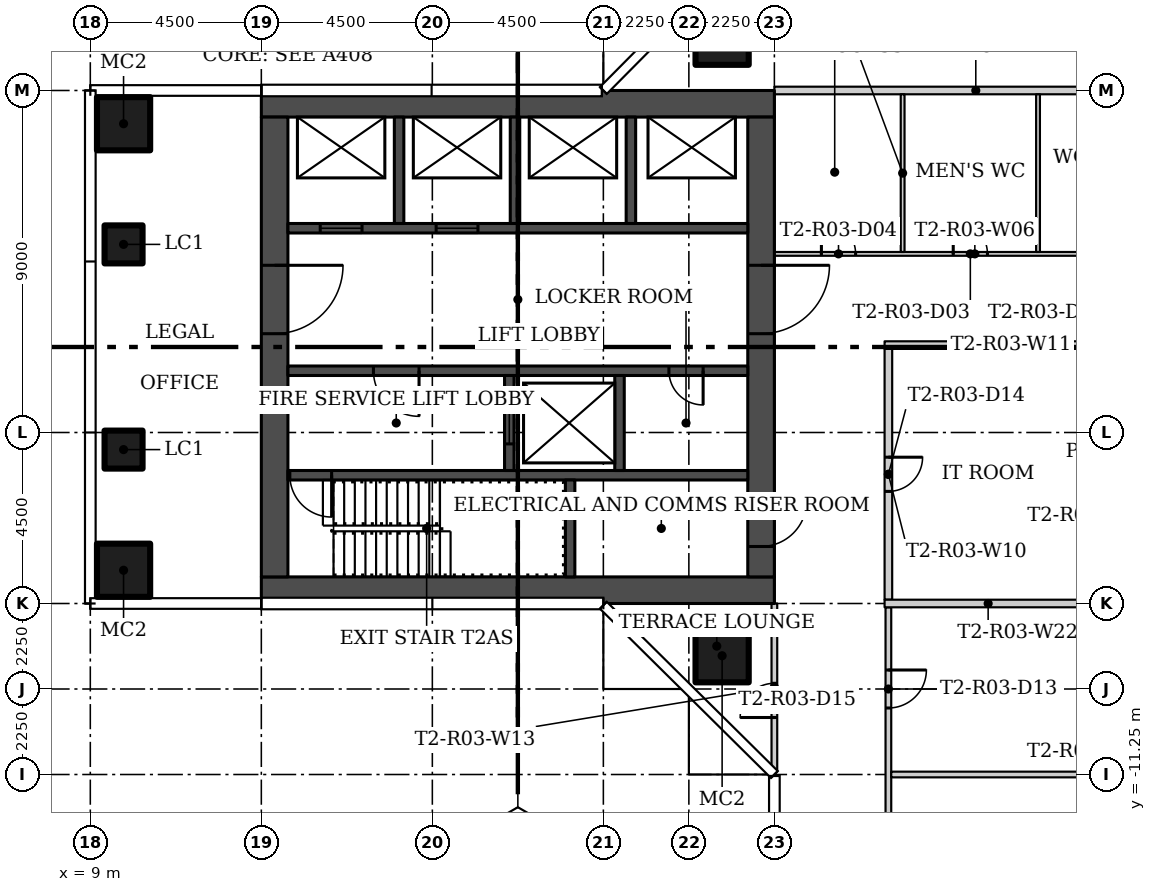
"""IFC4 building model, lengths in metres.
Left out: names, types, materials, properties, quantities, classifications, styles, units other than length and angle.
Written with IfcOpenShell. Run it as: python <this file> out.ifc"""

import sys

from ifc_helpers import new_model, si_unit, direction, frame, frame_2d, origin, origin_2d, place, context, subcontext, project, spatial, rectangle, hollow_rectangle, extrude, element, fill, save


model = new_model("IFC4")
c1 = context("Model", 3, precision=1e-05, world=origin(), true_north=direction((0.0, 1.0)))
c2 = subcontext(c1, "Body", "Model", "MODEL_VIEW")
j1 = project(units=[si_unit("LENGTHUNIT", "METRE"), si_unit("PLANEANGLEUNIT", "RADIAN")], contexts=[c1])
p1 = place(None, origin())
s1 = spatial("IfcSite", under=j1, at=p1, CompositionType="ELEMENT")
p2 = place(p1, origin())
s2 = spatial("IfcBuilding", under=s1, at=p2, CompositionType="ELEMENT")
p3 = place(p2, frame((0.0, 0.0, 42.0)))
s3 = spatial("IfcBuildingStorey", under=s2, at=p3, CompositionType="ELEMENT", Elevation=42.0)
for number, where in (
    (1, (25.625, 8.125, 0.0)),
    (2, (25.625, -8.125, 0.0)),
    (3, (9.875, -5.875, 0.0)),
    (4, (9.875, 5.875, 0.0)),
):
    element("IfcColumn", number, at=place(p3, frame(where)), inside=s3, PredefinedType="COLUMN", context=c2, shape_type="SweptSolid", body=[
        extrude(hollow_rectangle(XDim=1.4, YDim=1.4, WallThickness=0.05, at=origin_2d()), origin(), (0.0, 0.0, 1.0), 3.55),
    ])
for number, where in (
    (5, (9.875, -2.7, 0.0)),
    (6, (9.875, 2.7, 0.0)),
):
    element("IfcColumn", number, at=place(p3, frame(where)), inside=s3, PredefinedType="COLUMN", context=c2, shape_type="SweptSolid", body=[
        extrude(hollow_rectangle(XDim=1.0, YDim=1.0, WallThickness=0.04, at=origin_2d()), origin(), (0.0, 0.0, 1.0), 3.55),
    ])
p4 = place(p3, frame((27.0, 2.45, 0.0)))
e7 = element("IfcWall", 7, at=p4, inside=s3, PredefinedType="PARTITIONING", context=c2, shape_type="SweptSolid", body=[
    extrude(rectangle(XDim=10.55, YDim=0.1, at=frame_2d((5.275, 0.0))), origin(), (0.0, 0.0, 1.0), 3.55),
])
p5 = place(p4, frame((8.269, 0.0, 0.0)))
e8 = element("IfcOpeningElement", 8, at=p5, cuts=e7, PredefinedType="OPENING", context=c2, shape_type="SweptSolid", body=[
    extrude(rectangle(XDim=0.9, YDim=2.1, at=frame_2d((0.45, 1.05))), frame((0.0, 0.06, 0.0), z_axis=(0.0, -1.0, 0.0), x_axis=(1.0, 0.0, 0.0)), (0.0, 0.0, 1.0), 0.12),
])
p6 = place(p4, frame((4.706, 0.0, 0.0)))
e9 = element("IfcOpeningElement", 9, at=p6, cuts=e7, PredefinedType="OPENING", context=c2, shape_type="SweptSolid", body=[
    extrude(rectangle(XDim=0.9, YDim=2.1, at=frame_2d((0.45, 1.05))), frame((0.0, 0.06, 0.0), z_axis=(0.0, -1.0, 0.0), x_axis=(1.0, 0.0, 0.0)), (0.0, 0.0, 1.0), 0.12),
])
p7 = place(p4, frame((1.238, 0.0, 0.0)))
e10 = element("IfcOpeningElement", 10, at=p7, cuts=e7, PredefinedType="OPENING", context=c2, shape_type="SweptSolid", body=[
    extrude(rectangle(XDim=0.9, YDim=2.1, at=frame_2d((0.45, 1.05))), frame((0.0, 0.06, 0.0), z_axis=(0.0, -1.0, 0.0), x_axis=(1.0, 0.0, 0.0)), (0.0, 0.0, 1.0), 0.12),
])
p8 = place(p3, frame((30.0, -6.85, 0.0), z_axis=(0.0, 0.0, 1.0), x_axis=(0.0, -1.0, 0.0)))
e11 = element("IfcWall", 11, at=p8, inside=s3, PredefinedType="PARTITIONING", context=c2, shape_type="SweptSolid", body=[
    extrude(rectangle(XDim=13.325, YDim=0.15, at=frame_2d((6.663, 0.0))), origin(), (0.0, 0.0, 1.0), 3.55),
])
p9 = place(p8, frame((10.4, 0.0, 0.0)))
e12 = element("IfcOpeningElement", 12, at=p9, cuts=e11, PredefinedType="OPENING", context=c2, shape_type="SweptSolid", body=[
    extrude(rectangle(XDim=1.5, YDim=2.1, at=frame_2d((0.75, 1.05))), frame((0.0, 0.085, 0.0), z_axis=(0.0, -1.0, 0.0), x_axis=(1.0, 0.0, 0.0)), (0.0, 0.0, 1.0), 0.17),
])
p10 = place(p8, frame((5.9, 0.0, 0.0)))
e13 = element("IfcOpeningElement", 13, at=p10, cuts=e11, PredefinedType="OPENING", context=c2, shape_type="SweptSolid", body=[
    extrude(rectangle(XDim=1.5, YDim=2.1, at=frame_2d((0.75, 1.05))), frame((0.0, 0.085, 0.0), z_axis=(0.0, -1.0, 0.0), x_axis=(1.0, 0.0, 0.0)), (0.0, 0.0, 1.0), 0.17),
])
p11 = place(p8, frame((1.65, 0.0, 0.0)))
e14 = element("IfcOpeningElement", 14, at=p11, cuts=e11, PredefinedType="OPENING", context=c2, shape_type="SweptSolid", body=[
    extrude(rectangle(XDim=1.0, YDim=2.4, at=frame_2d((0.5, 1.2))), frame((0.0, 0.085, 0.0), z_axis=(0.0, -1.0, 0.0), x_axis=(1.0, 0.0, 0.0)), (0.0, 0.0, 1.0), 0.17),
])
p12 = place(p3, frame((30.0, -0.05, 0.0), z_axis=(0.0, 0.0, 1.0), x_axis=(0.0, -1.0, 0.0)))
e15 = element("IfcWall", 15, at=p12, inside=s3, PredefinedType="PARTITIONING", context=c2, shape_type="SweptSolid", body=[
    extrude(rectangle(XDim=6.6, YDim=0.2, at=frame_2d((3.3, 0.0))), origin(), (0.0, 0.0, 1.0), 3.55),
])
p13 = place(p12, frame((2.85, 0.0, 0.0)))
e16 = element("IfcOpeningElement", 16, at=p13, cuts=e15, PredefinedType="OPENING", context=c2, shape_type="SweptSolid", body=[
    extrude(rectangle(XDim=0.9, YDim=2.1, at=frame_2d((0.45, 1.05))), frame((0.0, 0.11, 0.0), z_axis=(0.0, -1.0, 0.0), x_axis=(1.0, 0.0, 0.0)), (0.0, 0.0, 1.0), 0.22),
])
p14 = place(p3, frame((35.35, 0.05, 0.0), z_axis=(0.0, 0.0, 1.0), x_axis=(-1.0, 0.0, 0.0)))
e17 = element("IfcWall", 17, at=p14, inside=s3, PredefinedType="PARTITIONING", context=c2, shape_type="SweptSolid", body=[
    extrude(rectangle(XDim=5.45, YDim=0.2, at=frame_2d((2.725, 0.0))), origin(), (0.0, 0.0, 1.0), 3.55),
])
p15 = place(p3, frame((27.0, -11.155, 0.0), z_axis=(0.0, 0.0, 1.0), x_axis=(0.0, 1.0, 0.0)))
e18 = element("IfcWall", 18, at=p15, inside=s3, PredefinedType="PARTITIONING", context=c2, shape_type="SweptSolid", body=[
    extrude(rectangle(XDim=4.405, YDim=0.15, at=frame_2d((2.203, 0.0))), origin(), (0.0, 0.0, 1.0), 3.55),
])
p16 = place(p15, frame((1.405, 0.0, 0.0)))
e19 = element("IfcOpeningElement", 19, at=p16, cuts=e18, PredefinedType="OPENING", context=c2, shape_type="SweptSolid", body=[
    extrude(rectangle(XDim=0.9, YDim=2.1, at=frame_2d((0.45, 1.05))), frame((0.0, 0.085, 0.0), z_axis=(0.0, -1.0, 0.0), x_axis=(1.0, 0.0, 0.0)), (0.0, 0.0, 1.0), 0.17),
])
p17 = place(p3, frame((27.0, 6.75, 0.0)))
e20 = element("IfcWall", 20, at=p17, inside=s3, PredefinedType="PARTITIONING", context=c2, shape_type="SweptSolid", body=[
    extrude(rectangle(XDim=10.6, YDim=0.2, at=frame_2d((5.3, 0.0))), origin(), (0.0, 0.0, 1.0), 3.55),
])
for number, where, z_axis, x_axis in (
    (21, (33.938, 6.65, 0.0), (0.0, 0.0, 1.0), (0.0, -1.0, 0.0)),
    (22, (30.375, 6.65, 0.0), (0.0, 0.0, 1.0), (0.0, -1.0, 0.0)),
):
    element("IfcWall", number, at=place(p3, frame(where, z_axis=z_axis, x_axis=x_axis)), inside=s3, PredefinedType="PARTITIONING", context=c2, shape_type="SweptSolid", body=[
        extrude(rectangle(XDim=4.15, YDim=0.1, at=frame_2d((2.075, 0.0))), origin(), (0.0, 0.0, 1.0), 3.55),
    ])
p18 = place(p3, frame((30.075, -11.25, 0.0)))
e23 = element("IfcWall", 23, at=p18, inside=s3, PredefinedType="PARTITIONING", context=c2, shape_type="SweptSolid", body=[
    extrude(rectangle(XDim=10.33, YDim=0.15, at=frame_2d((5.165, 0.0))), origin(), (0.0, 0.0, 1.0), 3.55),
])
p19 = place(p3, frame((35.35, -6.75, 0.0), z_axis=(0.0, 0.0, 1.0), x_axis=(-1.0, 0.0, 0.0)))
e24 = element("IfcWall", 24, at=p19, inside=s3, PredefinedType="PARTITIONING", context=c2, shape_type="SweptSolid", body=[
    extrude(rectangle(XDim=5.45, YDim=0.2, at=frame_2d((2.725, 0.0))), origin(), (0.0, 0.0, 1.0), 3.55),
])
for number, where in (
    (25, (13.5, -6.4, 0.0)),
    (26, (13.5, 6.4, 0.0)),
):
    element("IfcWall", number, at=place(p3, frame(where)), inside=s3, PredefinedType="SHEAR", context=c2, shape_type="SweptSolid", body=[
        extrude(rectangle(XDim=13.5, YDim=0.7, at=frame_2d((6.75, 0.0))), origin(), (0.0, 0.0, 1.0), 3.55),
    ])
p20 = place(p3, frame((13.85, 6.05, 0.0), z_axis=(0.0, 0.0, 1.0), x_axis=(0.0, -1.0, 0.0)))
e27 = element("IfcWall", 27, at=p20, inside=s3, PredefinedType="SHEAR", context=c2, shape_type="SweptSolid", body=[
    extrude(rectangle(XDim=12.1, YDim=0.7, at=frame_2d((6.05, 0.0))), origin(), (0.0, 0.0, 1.0), 3.55),
])
p21 = place(p20, frame((3.9, 0.0, 0.0)))
e28 = element("IfcOpeningElement", 28, at=p21, cuts=e27, PredefinedType="OPENING", context=c2, shape_type="SweptSolid", body=[
    extrude(rectangle(XDim=1.8, YDim=2.4, at=frame_2d((0.9, 1.2))), frame((0.0, 0.36, 0.0), z_axis=(0.0, -1.0, 0.0), x_axis=(1.0, 0.0, 0.0)), (0.0, 0.0, 1.0), 0.72),
])
p22 = place(p3, frame((26.65, 6.05, 0.0), z_axis=(0.0, 0.0, 1.0), x_axis=(0.0, -1.0, 0.0)))
e29 = element("IfcWall", 29, at=p22, inside=s3, PredefinedType="SHEAR", context=c2, shape_type="SweptSolid", body=[
    extrude(rectangle(XDim=12.1, YDim=0.7, at=frame_2d((6.05, 0.0))), origin(), (0.0, 0.0, 1.0), 3.55),
])
p23 = place(p22, frame((10.1, 0.0, 0.0)))
e30 = element("IfcOpeningElement", 30, at=p23, cuts=e29, PredefinedType="OPENING", context=c2, shape_type="SweptSolid", body=[
    extrude(rectangle(XDim=1.2, YDim=2.1, at=frame_2d((0.6, 1.05))), frame((0.0, 0.36, 0.0), z_axis=(0.0, -1.0, 0.0), x_axis=(1.0, 0.0, 0.0)), (0.0, 0.0, 1.0), 0.72),
])
p24 = place(p22, frame((3.9, 0.0, 0.0)))
e31 = element("IfcOpeningElement", 31, at=p24, cuts=e29, PredefinedType="OPENING", context=c2, shape_type="SweptSolid", body=[
    extrude(rectangle(XDim=1.8, YDim=2.4, at=frame_2d((0.9, 1.2))), frame((0.0, 0.36, 0.0), z_axis=(0.0, -1.0, 0.0), x_axis=(1.0, 0.0, 0.0)), (0.0, 0.0, 1.0), 0.72),
])
p25 = place(p3, frame((26.3, -3.375, 0.0), z_axis=(0.0, 0.0, 1.0), x_axis=(-1.0, 0.0, 0.0)))
e32 = element("IfcWall", 32, at=p25, inside=s3, PredefinedType="SHEAR", context=c2, shape_type="SweptSolid", body=[
    extrude(rectangle(XDim=12.1, YDim=0.25, at=frame_2d((6.05, 0.0))), origin(), (0.0, 0.0, 1.0), 3.55),
])
p26 = place(p25, frame((10.95, 0.0, 0.0)))
e33 = element("IfcOpeningElement", 33, at=p26, cuts=e32, PredefinedType="OPENING", context=c2, shape_type="SweptSolid", body=[
    extrude(rectangle(XDim=1.1, YDim=2.1, at=frame_2d((0.55, 1.05))), frame((0.0, 0.135, 0.0), z_axis=(0.0, -1.0, 0.0), x_axis=(1.0, 0.0, 0.0)), (0.0, 0.0, 1.0), 0.27),
])
p27 = place(p3, frame((21.625, -6.05, 0.0), z_axis=(0.0, 0.0, 1.0), x_axis=(0.0, 1.0, 0.0)))
e34 = element("IfcWall", 34, at=p27, inside=s3, PredefinedType="SHEAR", context=c2, shape_type="SweptSolid", body=[
    extrude(rectangle(XDim=2.55, YDim=0.25, at=frame_2d((1.275, 0.0))), origin(), (0.0, 0.0, 1.0), 3.55),
])
p28 = place(p3, frame((26.3, -0.625, 0.0), z_axis=(0.0, 0.0, 1.0), x_axis=(-1.0, 0.0, 0.0)))
e35 = element("IfcWall", 35, at=p28, inside=s3, PredefinedType="SHEAR", context=c2, shape_type="SweptSolid", body=[
    extrude(rectangle(XDim=12.1, YDim=0.25, at=frame_2d((6.05, 0.0))), origin(), (0.0, 0.0, 1.0), 3.55),
])
p29 = place(p28, frame((8.65, 0.0, 0.0)))
e36 = element("IfcOpeningElement", 36, at=p29, cuts=e35, PredefinedType="OPENING", context=c2, shape_type="SweptSolid", body=[
    extrude(rectangle(XDim=1.2, YDim=2.1, at=frame_2d((0.6, 1.05))), frame((0.0, 0.135, 0.0), z_axis=(0.0, -1.0, 0.0), x_axis=(1.0, 0.0, 0.0)), (0.0, 0.0, 1.0), 0.27),
])
p30 = place(p28, frame((1.175, 0.0, 0.0)))
e37 = element("IfcOpeningElement", 37, at=p30, cuts=e35, PredefinedType="OPENING", context=c2, shape_type="SweptSolid", body=[
    extrude(rectangle(XDim=0.9, YDim=2.1, at=frame_2d((0.45, 1.05))), frame((0.0, 0.135, 0.0), z_axis=(0.0, -1.0, 0.0), x_axis=(1.0, 0.0, 0.0)), (0.0, 0.0, 1.0), 0.27),
])
p31 = place(p3, frame((20.025, -3.25, 0.0), z_axis=(0.0, 0.0, 1.0), x_axis=(0.0, 1.0, 0.0)))
e38 = element("IfcWall", 38, at=p31, inside=s3, PredefinedType="SHEAR", context=c2, shape_type="SweptSolid", body=[
    extrude(rectangle(XDim=2.5, YDim=0.25, at=frame_2d((1.25, 0.0))), origin(), (0.0, 0.0, 1.0), 3.55),
])
p32 = place(p31, frame((0.7, 0.0, 0.0)))
e39 = element("IfcOpeningElement", 39, at=p32, cuts=e38, PredefinedType="OPENING", context=c2, shape_type="SweptSolid", body=[
    extrude(rectangle(XDim=1.1, YDim=2.1, at=frame_2d((0.55, 1.05))), frame((0.0, 0.135, 0.0), z_axis=(0.0, -1.0, 0.0), x_axis=(1.0, 0.0, 0.0)), (0.0, 0.0, 1.0), 0.27),
])
p33 = place(p3, frame((22.925, -3.25, 0.0), z_axis=(0.0, 0.0, 1.0), x_axis=(0.0, 1.0, 0.0)))
e40 = element("IfcWall", 40, at=p33, inside=s3, PredefinedType="SHEAR", context=c2, shape_type="SweptSolid", body=[
    extrude(rectangle(XDim=2.5, YDim=0.25, at=frame_2d((1.25, 0.0))), origin(), (0.0, 0.0, 1.0), 3.55),
])
p34 = place(p3, frame((14.2, 3.125, 0.0)))
e41 = element("IfcWall", 41, at=p34, inside=s3, PredefinedType="SHEAR", context=c2, shape_type="SweptSolid", body=[
    extrude(rectangle(XDim=12.1, YDim=0.25, at=frame_2d((6.05, 0.0))), origin(), (0.0, 0.0, 1.0), 3.55),
])
p35 = place(p34, frame((0.85, 0.0, 0.0)))
e42 = element("IfcOpeningElement", 42, at=p35, cuts=e41, PredefinedType="OPENING", context=c2, shape_type="SweptSolid", body=[
    extrude(rectangle(XDim=1.1, YDim=2.1, at=frame_2d((0.55, 1.05))), frame((0.0, 0.135, 0.0), z_axis=(0.0, -1.0, 0.0), x_axis=(1.0, 0.0, 0.0)), (0.0, 0.0, 1.0), 0.27),
])
p36 = place(p34, frame((3.9, 0.0, 0.0)))
e43 = element("IfcOpeningElement", 43, at=p36, cuts=e41, PredefinedType="OPENING", context=c2, shape_type="SweptSolid", body=[
    extrude(rectangle(XDim=1.1, YDim=2.1, at=frame_2d((0.55, 1.05))), frame((0.0, 0.135, 0.0), z_axis=(0.0, -1.0, 0.0), x_axis=(1.0, 0.0, 0.0)), (0.0, 0.0, 1.0), 0.27),
])
for number, where, z_axis, x_axis in (
    (44, (17.125, 3.25, 0.0), (0.0, 0.0, 1.0), (0.0, 1.0, 0.0)),
    (45, (20.175, 3.25, 0.0), (0.0, 0.0, 1.0), (0.0, 1.0, 0.0)),
    (46, (23.225, 3.25, 0.0), (0.0, 0.0, 1.0), (0.0, 1.0, 0.0)),
):
    element("IfcWall", number, at=place(p3, frame(where, z_axis=z_axis, x_axis=x_axis)), inside=s3, PredefinedType="SHEAR", context=c2, shape_type="SweptSolid", body=[
        extrude(rectangle(XDim=2.8, YDim=0.25, at=frame_2d((1.4, 0.0))), origin(), (0.0, 0.0, 1.0), 3.55),
    ])
p37 = place(p6, origin())
e47 = element("IfcDoor", 47, at=p37, inside=s3, OperationType="SINGLE_SWING_RIGHT", PredefinedType="DOOR", context=c2, shape_type="SweptSolid", body=[
    extrude(rectangle(XDim=0.9, YDim=2.1, at=frame_2d((0.45, 1.05))), frame((0.0, 0.025, 0.0), z_axis=(0.0, -1.0, 0.0), x_axis=(1.0, 0.0, 0.0)), (0.0, 0.0, 1.0), 0.05),
])
fill(e9, e47)
p38 = place(p7, origin())
e48 = element("IfcDoor", 48, at=p38, inside=s3, OperationType="SINGLE_SWING_RIGHT", PredefinedType="DOOR", context=c2, shape_type="SweptSolid", body=[
    extrude(rectangle(XDim=0.9, YDim=2.1, at=frame_2d((0.45, 1.05))), frame((0.0, 0.025, 0.0), z_axis=(0.0, -1.0, 0.0), x_axis=(1.0, 0.0, 0.0)), (0.0, 0.0, 1.0), 0.05),
])
fill(e10, e48)
p39 = place(p11, origin())
e49 = element("IfcDoor", 49, at=p39, inside=s3, OperationType="SINGLE_SWING_RIGHT", PredefinedType="DOOR", context=c2, shape_type="SweptSolid", body=[
    extrude(rectangle(XDim=1.0, YDim=2.4, at=frame_2d((0.5, 1.2))), frame((0.0, 0.025, 0.0), z_axis=(0.0, -1.0, 0.0), x_axis=(1.0, 0.0, 0.0)), (0.0, 0.0, 1.0), 0.05),
])
fill(e14, e49)
p40 = place(p13, origin())
e50 = element("IfcDoor", 50, at=p40, inside=s3, OperationType="SINGLE_SWING_LEFT", PredefinedType="DOOR", context=c2, shape_type="SweptSolid", body=[
    extrude(rectangle(XDim=0.9, YDim=2.1, at=frame_2d((0.45, 1.05))), frame((0.0, 0.025, 0.0), z_axis=(0.0, -1.0, 0.0), x_axis=(1.0, 0.0, 0.0)), (0.0, 0.0, 1.0), 0.05),
])
fill(e16, e50)
p41 = place(p16, origin())
e51 = element("IfcDoor", 51, at=p41, inside=s3, OperationType="SINGLE_SWING_LEFT", PredefinedType="DOOR", context=c2, shape_type="SweptSolid", body=[
    extrude(rectangle(XDim=0.9, YDim=2.1, at=frame_2d((0.45, 1.05))), frame((0.0, 0.025, 0.0), z_axis=(0.0, -1.0, 0.0), x_axis=(1.0, 0.0, 0.0)), (0.0, 0.0, 1.0), 0.05),
])
fill(e19, e51)
p42 = place(p21, origin())
e52 = element("IfcDoor", 52, at=p42, inside=s3, OperationType="DOUBLE_DOOR_SINGLE_SWING", PredefinedType="DOOR", context=c2, shape_type="SweptSolid", body=[
    extrude(rectangle(XDim=1.8, YDim=2.4, at=frame_2d((0.9, 1.2))), frame((0.0, 0.025, 0.0), z_axis=(0.0, -1.0, 0.0), x_axis=(1.0, 0.0, 0.0)), (0.0, 0.0, 1.0), 0.05),
])
fill(e28, e52)
p43 = place(p23, origin())
e53 = element("IfcDoor", 53, at=p43, inside=s3, OperationType="SINGLE_SWING_RIGHT", PredefinedType="DOOR", context=c2, shape_type="SweptSolid", body=[
    extrude(rectangle(XDim=1.2, YDim=2.1, at=frame_2d((0.6, 1.05))), frame((0.0, 0.025, 0.0), z_axis=(0.0, -1.0, 0.0), x_axis=(1.0, 0.0, 0.0)), (0.0, 0.0, 1.0), 0.05),
])
fill(e30, e53)
p44 = place(p24, origin())
e54 = element("IfcDoor", 54, at=p44, inside=s3, OperationType="DOUBLE_DOOR_SINGLE_SWING", PredefinedType="DOOR", context=c2, shape_type="SweptSolid", body=[
    extrude(rectangle(XDim=1.8, YDim=2.4, at=frame_2d((0.9, 1.2))), frame((0.0, 0.025, 0.0), z_axis=(0.0, -1.0, 0.0), x_axis=(1.0, 0.0, 0.0)), (0.0, 0.0, 1.0), 0.05),
])
fill(e31, e54)
p45 = place(p26, origin())
e55 = element("IfcDoor", 55, at=p45, inside=s3, OperationType="SINGLE_SWING_RIGHT", PredefinedType="DOOR", context=c2, shape_type="SweptSolid", body=[
    extrude(rectangle(XDim=1.1, YDim=2.1, at=frame_2d((0.55, 1.05))), frame((0.0, 0.025, 0.0), z_axis=(0.0, -1.0, 0.0), x_axis=(1.0, 0.0, 0.0)), (0.0, 0.0, 1.0), 0.05),
])
fill(e33, e55)
p46 = place(p29, origin())
e56 = element("IfcDoor", 56, at=p46, inside=s3, OperationType="SINGLE_SWING_RIGHT", PredefinedType="DOOR", context=c2, shape_type="SweptSolid", body=[
    extrude(rectangle(XDim=1.2, YDim=2.1, at=frame_2d((0.6, 1.05))), frame((0.0, 0.025, 0.0), z_axis=(0.0, -1.0, 0.0), x_axis=(1.0, 0.0, 0.0)), (0.0, 0.0, 1.0), 0.05),
])
fill(e36, e56)
p47 = place(p30, origin())
e57 = element("IfcDoor", 57, at=p47, inside=s3, OperationType="SINGLE_SWING_LEFT", PredefinedType="DOOR", context=c2, shape_type="SweptSolid", body=[
    extrude(rectangle(XDim=0.9, YDim=2.1, at=frame_2d((0.45, 1.05))), frame((0.0, 0.025, 0.0), z_axis=(0.0, -1.0, 0.0), x_axis=(1.0, 0.0, 0.0)), (0.0, 0.0, 1.0), 0.05),
])
fill(e37, e57)
p48 = place(p32, origin())
e58 = element("IfcDoor", 58, at=p48, inside=s3, OperationType="SLIDING_TO_LEFT", PredefinedType="DOOR", context=c2, shape_type="SweptSolid", body=[
    extrude(rectangle(XDim=1.1, YDim=2.1, at=frame_2d((0.55, 1.05))), frame((0.0, 0.025, 0.0), z_axis=(0.0, -1.0, 0.0), x_axis=(1.0, 0.0, 0.0)), (0.0, 0.0, 1.0), 0.05),
])
fill(e39, e58)
p49 = place(p35, origin())
e59 = element("IfcDoor", 59, at=p49, inside=s3, OperationType="SLIDING_TO_LEFT", PredefinedType="DOOR", context=c2, shape_type="SweptSolid", body=[
    extrude(rectangle(XDim=1.1, YDim=2.1, at=frame_2d((0.55, 1.05))), frame((0.0, 0.025, 0.0), z_axis=(0.0, -1.0, 0.0), x_axis=(1.0, 0.0, 0.0)), (0.0, 0.0, 1.0), 0.05),
])
fill(e42, e59)
p50 = place(p36, origin())
e60 = element("IfcDoor", 60, at=p50, inside=s3, OperationType="SLIDING_TO_LEFT", PredefinedType="DOOR", context=c2, shape_type="SweptSolid", body=[
    extrude(rectangle(XDim=1.1, YDim=2.1, at=frame_2d((0.55, 1.05))), frame((0.0, 0.025, 0.0), z_axis=(0.0, -1.0, 0.0), x_axis=(1.0, 0.0, 0.0)), (0.0, 0.0, 1.0), 0.05),
])
fill(e43, e60)
save(model, sys.argv[1])
